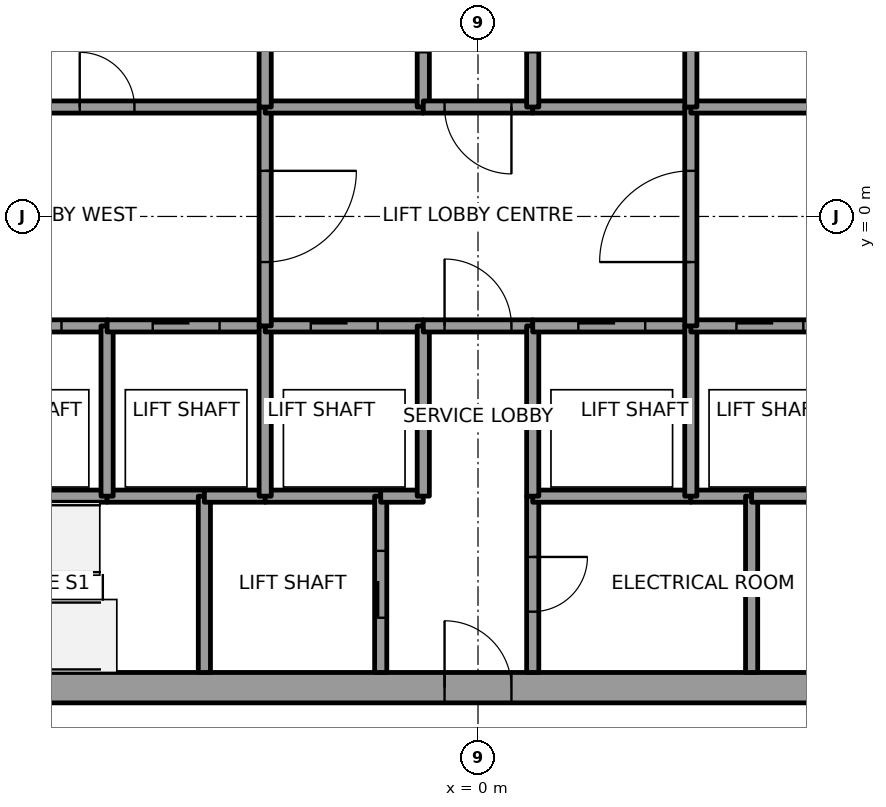
"""IFC4 building model, lengths in metres.
Left out: names, types, materials, properties, quantities, classifications, styles, units other than length and angle.
Written with IfcOpenShell. Run it as: python <this file> out.ifc"""

import sys

from ifc_helpers import new_model, si_unit, direction, frame, frame_2d, origin, place, context, subcontext, project, spatial, rectangle, extrude, element, fill, save


model = new_model("IFC4")
c1 = context("Model", 3, precision=1e-05, world=origin(), true_north=direction((0.0, 1.0)))
c2 = subcontext(c1, "Body", "Model", "MODEL_VIEW")
j1 = project(units=[si_unit("LENGTHUNIT", "METRE"), si_unit("PLANEANGLEUNIT", "RADIAN")], contexts=[c1])
p1 = place(None, origin())
s1 = spatial("IfcSite", under=j1, at=p1, CompositionType="ELEMENT")
p2 = place(p1, origin())
s2 = spatial("IfcBuilding", under=s1, at=p2, CompositionType="ELEMENT")
p3 = place(p2, frame((0.0, 0.0, 231.0)))
s3 = spatial("IfcBuildingStorey", under=s2, at=p3, CompositionType="ELEMENT", Elevation=231.0)
p4 = place(p3, frame((-11.0, -7.75, 0.0), z_axis=(0.0, 0.0, 1.0), x_axis=(1.0, 0.0, 0.0)))
e1 = element("IfcWall", 1, at=p4, inside=s3, PredefinedType="SHEAR", context=c2, shape_type="SweptSolid", body=[
    extrude(rectangle(XDim=22.0, YDim=0.5, at=frame_2d((11.0, 0.0))), origin(), (0.0, 0.0, 1.0), 4.0),
])
p5 = place(p4, frame((10.45, 0.0, 0.0)))
e2 = element("IfcOpeningElement", 2, at=p5, cuts=e1, PredefinedType="OPENING", context=c2, shape_type="SweptSolid", body=[
    extrude(rectangle(XDim=1.1, YDim=2.1, at=frame_2d((0.55, 1.05))), frame((0.0, 0.25, 0.0), z_axis=(0.0, -1.0, 0.0), x_axis=(1.0, 0.0, 0.0)), (0.0, 0.0, 1.0), 0.5),
])
p6 = place(p3, frame((-8.7, -4.6, 0.0), z_axis=(0.0, 0.0, 1.0), x_axis=(1.0, 0.0, 0.0)))
e3 = element("IfcWall", 3, at=p6, inside=s3, PredefinedType="SOLIDWALL", context=c2, shape_type="SweptSolid", body=[
    extrude(rectangle(XDim=2.6, YDim=0.2, at=frame_2d((1.3, 0.0))), origin(), (0.0, 0.0, 1.0), 3.85),
])
p7 = place(p3, frame((-8.7, -1.8, 0.0), z_axis=(0.0, 0.0, 1.0), x_axis=(1.0, 0.0, 0.0)))
e4 = element("IfcWall", 4, at=p7, inside=s3, PredefinedType="SOLIDWALL", context=c2, shape_type="SweptSolid", body=[
    extrude(rectangle(XDim=2.6, YDim=0.2, at=frame_2d((1.3, 0.0))), origin(), (0.0, 0.0, 1.0), 3.85),
])
p8 = place(p7, frame((0.75, 0.0, 0.0)))
e5 = element("IfcOpeningElement", 5, at=p8, cuts=e4, PredefinedType="OPENING", context=c2, shape_type="SweptSolid", body=[
    extrude(rectangle(XDim=1.1, YDim=2.1, at=frame_2d((0.55, 1.05))), frame((0.0, 0.1, 0.0), z_axis=(0.0, -1.0, 0.0), x_axis=(1.0, 0.0, 0.0)), (0.0, 0.0, 1.0), 0.2),
])
p9 = place(p3, frame((-8.7, 1.8, 0.0), z_axis=(0.0, 0.0, 1.0), x_axis=(1.0, 0.0, 0.0)))
e6 = element("IfcWall", 6, at=p9, inside=s3, PredefinedType="SOLIDWALL", context=c2, shape_type="SweptSolid", body=[
    extrude(rectangle(XDim=5.2, YDim=0.2, at=frame_2d((2.6, 0.0))), origin(), (0.0, 0.0, 1.0), 3.85),
])
p10 = place(p9, frame((2.15, 0.0, 0.0)))
e7 = element("IfcOpeningElement", 7, at=p10, cuts=e6, PredefinedType="OPENING", context=c2, shape_type="SweptSolid", body=[
    extrude(rectangle(XDim=0.9, YDim=2.1, at=frame_2d((0.45, 1.05))), frame((0.0, 0.1, 0.0), z_axis=(0.0, -1.0, 0.0), x_axis=(1.0, 0.0, 0.0)), (0.0, 0.0, 1.0), 0.2),
])
p11 = place(p3, frame((-6.1, -4.6, 0.0), z_axis=(0.0, 0.0, 1.0), x_axis=(1.0, 0.0, 0.0)))
e8 = element("IfcWall", 8, at=p11, inside=s3, PredefinedType="SOLIDWALL", context=c2, shape_type="SweptSolid", body=[
    extrude(rectangle(XDim=1.6, YDim=0.2, at=frame_2d((0.8, 0.0))), origin(), (0.0, 0.0, 1.0), 3.85),
])
p12 = place(p3, frame((-6.1, -4.6, 0.0), z_axis=(0.0, 0.0, 1.0), x_axis=(0.0, 1.0, 0.0)))
e9 = element("IfcWall", 9, at=p12, inside=s3, PredefinedType="SOLIDWALL", context=c2, shape_type="SweptSolid", body=[
    extrude(rectangle(XDim=2.8, YDim=0.2, at=frame_2d((1.4, 0.0))), origin(), (0.0, 0.0, 1.0), 3.85),
])
p13 = place(p3, frame((-6.1, -1.8, 0.0), z_axis=(0.0, 0.0, 1.0), x_axis=(1.0, 0.0, 0.0)))
e10 = element("IfcWall", 10, at=p13, inside=s3, PredefinedType="SOLIDWALL", context=c2, shape_type="SweptSolid", body=[
    extrude(rectangle(XDim=2.6, YDim=0.2, at=frame_2d((1.3, 0.0))), origin(), (0.0, 0.0, 1.0), 3.85),
])
p14 = place(p13, frame((0.75, 0.0, 0.0)))
e11 = element("IfcOpeningElement", 11, at=p14, cuts=e10, PredefinedType="OPENING", context=c2, shape_type="SweptSolid", body=[
    extrude(rectangle(XDim=1.1, YDim=2.1, at=frame_2d((0.55, 1.05))), frame((0.0, 0.1, 0.0), z_axis=(0.0, -1.0, 0.0), x_axis=(1.0, 0.0, 0.0)), (0.0, 0.0, 1.0), 0.2),
])
p15 = place(p3, frame((-4.5, -4.6, 0.0), z_axis=(0.0, 0.0, 1.0), x_axis=(0.0, -1.0, 0.0)))
e12 = element("IfcWall", 12, at=p15, inside=s3, PredefinedType="SOLIDWALL", context=c2, shape_type="SweptSolid", body=[
    extrude(rectangle(XDim=2.9, YDim=0.2, at=frame_2d((1.45, 0.0))), origin(), (0.0, 0.0, 1.0), 3.85),
])
p16 = place(p3, frame((-4.5, -4.6, 0.0), z_axis=(0.0, 0.0, 1.0), x_axis=(1.0, 0.0, 0.0)))
e13 = element("IfcWall", 13, at=p16, inside=s3, PredefinedType="SOLIDWALL", context=c2, shape_type="SweptSolid", body=[
    extrude(rectangle(XDim=1.0, YDim=0.2, at=frame_2d((0.5, 0.0))), origin(), (0.0, 0.0, 1.0), 3.85),
])
p17 = place(p3, frame((-3.5, -4.6, 0.0), z_axis=(0.0, 0.0, 1.0), x_axis=(1.0, 0.0, 0.0)))
e14 = element("IfcWall", 14, at=p17, inside=s3, PredefinedType="SOLIDWALL", context=c2, shape_type="SweptSolid", body=[
    extrude(rectangle(XDim=1.9, YDim=0.2, at=frame_2d((0.95, 0.0))), origin(), (0.0, 0.0, 1.0), 3.85),
])
p18 = place(p3, frame((-3.5, -4.6, 0.0), z_axis=(0.0, 0.0, 1.0), x_axis=(0.0, 1.0, 0.0)))
e15 = element("IfcWall", 15, at=p18, inside=s3, PredefinedType="SOLIDWALL", context=c2, shape_type="SweptSolid", body=[
    extrude(rectangle(XDim=2.8, YDim=0.2, at=frame_2d((1.4, 0.0))), origin(), (0.0, 0.0, 1.0), 3.85),
])
p19 = place(p3, frame((-3.5, -1.8, 0.0), z_axis=(0.0, 0.0, 1.0), x_axis=(1.0, 0.0, 0.0)))
e16 = element("IfcWall", 16, at=p19, inside=s3, PredefinedType="SOLIDWALL", context=c2, shape_type="SweptSolid", body=[
    extrude(rectangle(XDim=2.6, YDim=0.2, at=frame_2d((1.3, 0.0))), origin(), (0.0, 0.0, 1.0), 3.85),
])
p20 = place(p19, frame((0.75, 0.0, 0.0)))
e17 = element("IfcOpeningElement", 17, at=p20, cuts=e16, PredefinedType="OPENING", context=c2, shape_type="SweptSolid", body=[
    extrude(rectangle(XDim=1.1, YDim=2.1, at=frame_2d((0.55, 1.05))), frame((0.0, 0.1, 0.0), z_axis=(0.0, -1.0, 0.0), x_axis=(1.0, 0.0, 0.0)), (0.0, 0.0, 1.0), 0.2),
])
p21 = place(p3, frame((-3.5, 1.8, 0.0), z_axis=(0.0, 0.0, 1.0), x_axis=(0.0, -1.0, 0.0)))
e18 = element("IfcWall", 18, at=p21, inside=s3, PredefinedType="SOLIDWALL", context=c2, shape_type="SweptSolid", body=[
    extrude(rectangle(XDim=3.6, YDim=0.2, at=frame_2d((1.8, 0.0))), origin(), (0.0, 0.0, 1.0), 3.85),
])
p22 = place(p21, frame((1.05, 0.0, 0.0)))
e19 = element("IfcOpeningElement", 19, at=p22, cuts=e18, PredefinedType="OPENING", context=c2, shape_type="SweptSolid", body=[
    extrude(rectangle(XDim=1.5, YDim=2.1, at=frame_2d((0.75, 1.05))), frame((0.0, 0.1, 0.0), z_axis=(0.0, -1.0, 0.0), x_axis=(1.0, 0.0, 0.0)), (0.0, 0.0, 1.0), 0.2),
])
p23 = place(p3, frame((-0.9, 1.8, 0.0), z_axis=(0.0, 0.0, 1.0), x_axis=(-1.0, 0.0, 0.0)))
e20 = element("IfcWall", 20, at=p23, inside=s3, PredefinedType="SOLIDWALL", context=c2, shape_type="SweptSolid", body=[
    extrude(rectangle(XDim=2.6, YDim=0.2, at=frame_2d((1.3, 0.0))), origin(), (0.0, 0.0, 1.0), 3.85),
])
p24 = place(p3, frame((-3.5, 1.8, 0.0), z_axis=(0.0, 0.0, 1.0), x_axis=(0.0, 1.0, 0.0)))
e21 = element("IfcWall", 21, at=p24, inside=s3, PredefinedType="SOLIDWALL", context=c2, shape_type="SweptSolid", body=[
    extrude(rectangle(XDim=2.8, YDim=0.2, at=frame_2d((1.4, 0.0))), origin(), (0.0, 0.0, 1.0), 3.85),
])
p25 = place(p3, frame((-0.9, 1.8, 0.0), z_axis=(0.0, 0.0, 1.0), x_axis=(0.0, 1.0, 0.0)))
e22 = element("IfcWall", 22, at=p25, inside=s3, PredefinedType="SOLIDWALL", context=c2, shape_type="SweptSolid", body=[
    extrude(rectangle(XDim=3.0, YDim=0.2, at=frame_2d((1.5, 0.0))), origin(), (0.0, 0.0, 1.0), 3.85),
])
p26 = place(p25, frame((0.9, 0.0, 0.0)))
e23 = element("IfcOpeningElement", 23, at=p26, cuts=e22, PredefinedType="OPENING", context=c2, shape_type="SweptSolid", body=[
    extrude(rectangle(XDim=1.2, YDim=2.1, at=frame_2d((0.6, 1.05))), frame((0.0, 0.1, 0.0), z_axis=(0.0, -1.0, 0.0), x_axis=(1.0, 0.0, 0.0)), (0.0, 0.0, 1.0), 0.2),
])
p27 = place(p3, frame((-1.6, -7.5, 0.0), z_axis=(0.0, 0.0, 1.0), x_axis=(0.0, 1.0, 0.0)))
e24 = element("IfcWall", 24, at=p27, inside=s3, PredefinedType="SOLIDWALL", context=c2, shape_type="SweptSolid", body=[
    extrude(rectangle(XDim=2.9, YDim=0.2, at=frame_2d((1.45, 0.0))), origin(), (0.0, 0.0, 1.0), 3.85),
])
p28 = place(p27, frame((0.9, 0.0, 0.0)))
e25 = element("IfcOpeningElement", 25, at=p28, cuts=e24, PredefinedType="OPENING", context=c2, shape_type="SweptSolid", body=[
    extrude(rectangle(XDim=1.1, YDim=2.1, at=frame_2d((0.55, 1.05))), frame((0.0, 0.1, 0.0), z_axis=(0.0, -1.0, 0.0), x_axis=(1.0, 0.0, 0.0)), (0.0, 0.0, 1.0), 0.2),
])
p29 = place(p3, frame((-1.6, -4.6, 0.0), z_axis=(0.0, 0.0, 1.0), x_axis=(1.0, 0.0, 0.0)))
e26 = element("IfcWall", 26, at=p29, inside=s3, PredefinedType="SOLIDWALL", context=c2, shape_type="SweptSolid", body=[
    extrude(rectangle(XDim=0.7, YDim=0.2, at=frame_2d((0.35, 0.0))), origin(), (0.0, 0.0, 1.0), 3.85),
])
p30 = place(p3, frame((-0.9, -4.6, 0.0), z_axis=(0.0, 0.0, 1.0), x_axis=(0.0, 1.0, 0.0)))
e27 = element("IfcWall", 27, at=p30, inside=s3, PredefinedType="SOLIDWALL", context=c2, shape_type="SweptSolid", body=[
    extrude(rectangle(XDim=2.8, YDim=0.2, at=frame_2d((1.4, 0.0))), origin(), (0.0, 0.0, 1.0), 3.85),
])
p31 = place(p3, frame((-0.9, -1.8, 0.0), z_axis=(0.0, 0.0, 1.0), x_axis=(1.0, 0.0, 0.0)))
e28 = element("IfcWall", 28, at=p31, inside=s3, PredefinedType="SOLIDWALL", context=c2, shape_type="SweptSolid", body=[
    extrude(rectangle(XDim=1.8, YDim=0.2, at=frame_2d((0.9, 0.0))), origin(), (0.0, 0.0, 1.0), 3.85),
])
p32 = place(p31, frame((0.35, 0.0, 0.0)))
e29 = element("IfcOpeningElement", 29, at=p32, cuts=e28, PredefinedType="OPENING", context=c2, shape_type="SweptSolid", body=[
    extrude(rectangle(XDim=1.1, YDim=2.1, at=frame_2d((0.55, 1.05))), frame((0.0, 0.1, 0.0), z_axis=(0.0, -1.0, 0.0), x_axis=(1.0, 0.0, 0.0)), (0.0, 0.0, 1.0), 0.2),
])
p33 = place(p3, frame((0.9, 1.8, 0.0), z_axis=(0.0, 0.0, 1.0), x_axis=(-1.0, 0.0, 0.0)))
e30 = element("IfcWall", 30, at=p33, inside=s3, PredefinedType="SOLIDWALL", context=c2, shape_type="SweptSolid", body=[
    extrude(rectangle(XDim=1.8, YDim=0.2, at=frame_2d((0.9, 0.0))), origin(), (0.0, 0.0, 1.0), 3.85),
])
p34 = place(p33, frame((0.35, 0.0, 0.0)))
e31 = element("IfcOpeningElement", 31, at=p34, cuts=e30, PredefinedType="OPENING", context=c2, shape_type="SweptSolid", body=[
    extrude(rectangle(XDim=1.1, YDim=2.1, at=frame_2d((0.55, 1.05))), frame((0.0, 0.1, 0.0), z_axis=(0.0, -1.0, 0.0), x_axis=(1.0, 0.0, 0.0)), (0.0, 0.0, 1.0), 0.2),
])
p35 = place(p3, frame((0.9, -4.6, 0.0), z_axis=(0.0, 0.0, 1.0), x_axis=(0.0, -1.0, 0.0)))
e32 = element("IfcWall", 32, at=p35, inside=s3, PredefinedType="SOLIDWALL", context=c2, shape_type="SweptSolid", body=[
    extrude(rectangle(XDim=2.9, YDim=0.2, at=frame_2d((1.45, 0.0))), origin(), (0.0, 0.0, 1.0), 3.85),
])
p36 = place(p35, frame((1.0, 0.0, 0.0)))
e33 = element("IfcOpeningElement", 33, at=p36, cuts=e32, PredefinedType="OPENING", context=c2, shape_type="SweptSolid", body=[
    extrude(rectangle(XDim=0.9, YDim=2.1, at=frame_2d((0.45, 1.05))), frame((0.0, 0.1, 0.0), z_axis=(0.0, -1.0, 0.0), x_axis=(1.0, 0.0, 0.0)), (0.0, 0.0, 1.0), 0.2),
])
p37 = place(p3, frame((3.5, -4.6, 0.0), z_axis=(0.0, 0.0, 1.0), x_axis=(-1.0, 0.0, 0.0)))
e34 = element("IfcWall", 34, at=p37, inside=s3, PredefinedType="SOLIDWALL", context=c2, shape_type="SweptSolid", body=[
    extrude(rectangle(XDim=2.6, YDim=0.2, at=frame_2d((1.3, 0.0))), origin(), (0.0, 0.0, 1.0), 3.85),
])
p38 = place(p3, frame((0.9, -1.8, 0.0), z_axis=(0.0, 0.0, 1.0), x_axis=(0.0, -1.0, 0.0)))
e35 = element("IfcWall", 35, at=p38, inside=s3, PredefinedType="SOLIDWALL", context=c2, shape_type="SweptSolid", body=[
    extrude(rectangle(XDim=2.8, YDim=0.2, at=frame_2d((1.4, 0.0))), origin(), (0.0, 0.0, 1.0), 3.85),
])
p39 = place(p3, frame((0.9, -1.8, 0.0), z_axis=(0.0, 0.0, 1.0), x_axis=(1.0, 0.0, 0.0)))
e36 = element("IfcWall", 36, at=p39, inside=s3, PredefinedType="SOLIDWALL", context=c2, shape_type="SweptSolid", body=[
    extrude(rectangle(XDim=2.6, YDim=0.2, at=frame_2d((1.3, 0.0))), origin(), (0.0, 0.0, 1.0), 3.85),
])
p40 = place(p39, frame((0.75, 0.0, 0.0)))
e37 = element("IfcOpeningElement", 37, at=p40, cuts=e36, PredefinedType="OPENING", context=c2, shape_type="SweptSolid", body=[
    extrude(rectangle(XDim=1.1, YDim=2.1, at=frame_2d((0.55, 1.05))), frame((0.0, 0.1, 0.0), z_axis=(0.0, -1.0, 0.0), x_axis=(1.0, 0.0, 0.0)), (0.0, 0.0, 1.0), 0.2),
])
p41 = place(p3, frame((3.5, 1.8, 0.0), z_axis=(0.0, 0.0, 1.0), x_axis=(-1.0, 0.0, 0.0)))
e38 = element("IfcWall", 38, at=p41, inside=s3, PredefinedType="SOLIDWALL", context=c2, shape_type="SweptSolid", body=[
    extrude(rectangle(XDim=2.6, YDim=0.2, at=frame_2d((1.3, 0.0))), origin(), (0.0, 0.0, 1.0), 3.85),
])
p42 = place(p3, frame((0.9, 4.8, 0.0), z_axis=(0.0, 0.0, 1.0), x_axis=(0.0, -1.0, 0.0)))
e39 = element("IfcWall", 39, at=p42, inside=s3, PredefinedType="SOLIDWALL", context=c2, shape_type="SweptSolid", body=[
    extrude(rectangle(XDim=3.0, YDim=0.2, at=frame_2d((1.5, 0.0))), origin(), (0.0, 0.0, 1.0), 3.85),
])
p43 = place(p42, frame((0.9, 0.0, 0.0)))
e40 = element("IfcOpeningElement", 40, at=p43, cuts=e39, PredefinedType="OPENING", context=c2, shape_type="SweptSolid", body=[
    extrude(rectangle(XDim=1.2, YDim=2.1, at=frame_2d((0.6, 1.05))), frame((0.0, 0.1, 0.0), z_axis=(0.0, -1.0, 0.0), x_axis=(1.0, 0.0, 0.0)), (0.0, 0.0, 1.0), 0.2),
])
p44 = place(p3, frame((4.5, -4.6, 0.0), z_axis=(0.0, 0.0, 1.0), x_axis=(-1.0, 0.0, 0.0)))
e41 = element("IfcWall", 41, at=p44, inside=s3, PredefinedType="SOLIDWALL", context=c2, shape_type="SweptSolid", body=[
    extrude(rectangle(XDim=1.0, YDim=0.2, at=frame_2d((0.5, 0.0))), origin(), (0.0, 0.0, 1.0), 3.85),
])
p45 = place(p3, frame((3.5, -4.6, 0.0), z_axis=(0.0, 0.0, 1.0), x_axis=(0.0, 1.0, 0.0)))
e42 = element("IfcWall", 42, at=p45, inside=s3, PredefinedType="SOLIDWALL", context=c2, shape_type="SweptSolid", body=[
    extrude(rectangle(XDim=2.8, YDim=0.2, at=frame_2d((1.4, 0.0))), origin(), (0.0, 0.0, 1.0), 3.85),
])
p46 = place(p3, frame((3.5, -1.8, 0.0), z_axis=(0.0, 0.0, 1.0), x_axis=(1.0, 0.0, 0.0)))
e43 = element("IfcWall", 43, at=p46, inside=s3, PredefinedType="SOLIDWALL", context=c2, shape_type="SweptSolid", body=[
    extrude(rectangle(XDim=2.6, YDim=0.2, at=frame_2d((1.3, 0.0))), origin(), (0.0, 0.0, 1.0), 3.85),
])
p47 = place(p46, frame((0.75, 0.0, 0.0)))
e44 = element("IfcOpeningElement", 44, at=p47, cuts=e43, PredefinedType="OPENING", context=c2, shape_type="SweptSolid", body=[
    extrude(rectangle(XDim=1.1, YDim=2.1, at=frame_2d((0.55, 1.05))), frame((0.0, 0.1, 0.0), z_axis=(0.0, -1.0, 0.0), x_axis=(1.0, 0.0, 0.0)), (0.0, 0.0, 1.0), 0.2),
])
p48 = place(p3, frame((3.5, -1.8, 0.0), z_axis=(0.0, 0.0, 1.0), x_axis=(0.0, 1.0, 0.0)))
e45 = element("IfcWall", 45, at=p48, inside=s3, PredefinedType="SOLIDWALL", context=c2, shape_type="SweptSolid", body=[
    extrude(rectangle(XDim=3.6, YDim=0.2, at=frame_2d((1.8, 0.0))), origin(), (0.0, 0.0, 1.0), 3.85),
])
p49 = place(p48, frame((1.05, 0.0, 0.0)))
e46 = element("IfcOpeningElement", 46, at=p49, cuts=e45, PredefinedType="OPENING", context=c2, shape_type="SweptSolid", body=[
    extrude(rectangle(XDim=1.5, YDim=2.1, at=frame_2d((0.75, 1.05))), frame((0.0, 0.1, 0.0), z_axis=(0.0, -1.0, 0.0), x_axis=(1.0, 0.0, 0.0)), (0.0, 0.0, 1.0), 0.2),
])
p50 = place(p3, frame((3.5, 1.8, 0.0), z_axis=(0.0, 0.0, 1.0), x_axis=(1.0, 0.0, 0.0)))
e47 = element("IfcWall", 47, at=p50, inside=s3, PredefinedType="SOLIDWALL", context=c2, shape_type="SweptSolid", body=[
    extrude(rectangle(XDim=5.2, YDim=0.2, at=frame_2d((2.6, 0.0))), origin(), (0.0, 0.0, 1.0), 3.85),
])
p51 = place(p50, frame((2.15, 0.0, 0.0)))
e48 = element("IfcOpeningElement", 48, at=p51, cuts=e47, PredefinedType="OPENING", context=c2, shape_type="SweptSolid", body=[
    extrude(rectangle(XDim=0.9, YDim=2.1, at=frame_2d((0.45, 1.05))), frame((0.0, 0.1, 0.0), z_axis=(0.0, -1.0, 0.0), x_axis=(1.0, 0.0, 0.0)), (0.0, 0.0, 1.0), 0.2),
])
p52 = place(p3, frame((3.5, 4.6, 0.0), z_axis=(0.0, 0.0, 1.0), x_axis=(0.0, -1.0, 0.0)))
e49 = element("IfcWall", 49, at=p52, inside=s3, PredefinedType="SOLIDWALL", context=c2, shape_type="SweptSolid", body=[
    extrude(rectangle(XDim=2.8, YDim=0.2, at=frame_2d((1.4, 0.0))), origin(), (0.0, 0.0, 1.0), 3.85),
])
p53 = place(p3, frame((4.5, -4.6, 0.0), z_axis=(0.0, 0.0, 1.0), x_axis=(0.0, -1.0, 0.0)))
e50 = element("IfcWall", 50, at=p53, inside=s3, PredefinedType="SOLIDWALL", context=c2, shape_type="SweptSolid", body=[
    extrude(rectangle(XDim=2.9, YDim=0.2, at=frame_2d((1.45, 0.0))), origin(), (0.0, 0.0, 1.0), 3.85),
])
p54 = place(p3, frame((6.1, -4.6, 0.0), z_axis=(0.0, 0.0, 1.0), x_axis=(-1.0, 0.0, 0.0)))
e51 = element("IfcWall", 51, at=p54, inside=s3, PredefinedType="SOLIDWALL", context=c2, shape_type="SweptSolid", body=[
    extrude(rectangle(XDim=1.6, YDim=0.2, at=frame_2d((0.8, 0.0))), origin(), (0.0, 0.0, 1.0), 3.85),
])
p55 = place(p8, origin())
e52 = element("IfcDoor", 52, at=p55, inside=s3, OperationType="SLIDING_TO_LEFT", PredefinedType="DOOR", context=c2, shape_type="SweptSolid", body=[
    extrude(rectangle(XDim=1.1, YDim=2.1, at=frame_2d((0.55, 1.05))), frame((0.0, 0.025, 0.0), z_axis=(0.0, -1.0, 0.0), x_axis=(1.0, 0.0, 0.0)), (0.0, 0.0, 1.0), 0.05),
])
fill(e5, e52)
p56 = place(p14, origin())
e53 = element("IfcDoor", 53, at=p56, inside=s3, OperationType="SLIDING_TO_RIGHT", PredefinedType="DOOR", context=c2, shape_type="SweptSolid", body=[
    extrude(rectangle(XDim=1.1, YDim=2.1, at=frame_2d((0.55, 1.05))), frame((0.0, 0.025, 0.0), z_axis=(0.0, -1.0, 0.0), x_axis=(1.0, 0.0, 0.0)), (0.0, 0.0, 1.0), 0.05),
])
fill(e11, e53)
p57 = place(p20, origin())
e54 = element("IfcDoor", 54, at=p57, inside=s3, OperationType="SLIDING_TO_LEFT", PredefinedType="DOOR", context=c2, shape_type="SweptSolid", body=[
    extrude(rectangle(XDim=1.1, YDim=2.1, at=frame_2d((0.55, 1.05))), frame((0.0, 0.025, 0.0), z_axis=(0.0, -1.0, 0.0), x_axis=(1.0, 0.0, 0.0)), (0.0, 0.0, 1.0), 0.05),
])
fill(e17, e54)
p58 = place(p40, origin())
e55 = element("IfcDoor", 55, at=p58, inside=s3, OperationType="SLIDING_TO_LEFT", PredefinedType="DOOR", context=c2, shape_type="SweptSolid", body=[
    extrude(rectangle(XDim=1.1, YDim=2.1, at=frame_2d((0.55, 1.05))), frame((0.0, 0.025, 0.0), z_axis=(0.0, -1.0, 0.0), x_axis=(1.0, 0.0, 0.0)), (0.0, 0.0, 1.0), 0.05),
])
fill(e37, e55)
p59 = place(p47, origin())
e56 = element("IfcDoor", 56, at=p59, inside=s3, OperationType="SLIDING_TO_RIGHT", PredefinedType="DOOR", context=c2, shape_type="SweptSolid", body=[
    extrude(rectangle(XDim=1.1, YDim=2.1, at=frame_2d((0.55, 1.05))), frame((0.0, 0.025, 0.0), z_axis=(0.0, -1.0, 0.0), x_axis=(1.0, 0.0, 0.0)), (0.0, 0.0, 1.0), 0.05),
])
fill(e44, e56)
p60 = place(p28, origin())
e57 = element("IfcDoor", 57, at=p60, inside=s3, OperationType="SLIDING_TO_LEFT", PredefinedType="DOOR", context=c2, shape_type="SweptSolid", body=[
    extrude(rectangle(XDim=1.1, YDim=2.1, at=frame_2d((0.55, 1.05))), frame((0.0, 0.025, 0.0), z_axis=(0.0, -1.0, 0.0), x_axis=(1.0, 0.0, 0.0)), (0.0, 0.0, 1.0), 0.05),
])
fill(e25, e57)
p61 = place(p22, origin())
e58 = element("IfcDoor", 58, at=p61, inside=s3, OperationType="DOUBLE_DOOR_SINGLE_SWING", PredefinedType="DOOR", context=c2, shape_type="SweptSolid", body=[
    extrude(rectangle(XDim=1.5, YDim=2.1, at=frame_2d((0.75, 1.05))), frame((0.0, 0.025, 0.0), z_axis=(0.0, -1.0, 0.0), x_axis=(1.0, 0.0, 0.0)), (0.0, 0.0, 1.0), 0.05),
])
fill(e19, e58)
p62 = place(p49, origin())
e59 = element("IfcDoor", 59, at=p62, inside=s3, OperationType="DOUBLE_DOOR_SINGLE_SWING", PredefinedType="DOOR", context=c2, shape_type="SweptSolid", body=[
    extrude(rectangle(XDim=1.5, YDim=2.1, at=frame_2d((0.75, 1.05))), frame((0.0, 0.025, 0.0), z_axis=(0.0, -1.0, 0.0), x_axis=(1.0, 0.0, 0.0)), (0.0, 0.0, 1.0), 0.05),
])
fill(e46, e59)
p63 = place(p34, origin())
e60 = element("IfcDoor", 60, at=p63, inside=s3, OperationType="SINGLE_SWING_RIGHT", PredefinedType="DOOR", context=c2, shape_type="SweptSolid", body=[
    extrude(rectangle(XDim=1.1, YDim=2.1, at=frame_2d((0.55, 1.05))), frame((0.0, 0.025, 0.0), z_axis=(0.0, -1.0, 0.0), x_axis=(1.0, 0.0, 0.0)), (0.0, 0.0, 1.0), 0.05),
])
fill(e31, e60)
p64 = place(p32, origin())
e61 = element("IfcDoor", 61, at=p64, inside=s3, OperationType="SINGLE_SWING_RIGHT", PredefinedType="DOOR", context=c2, shape_type="SweptSolid", body=[
    extrude(rectangle(XDim=1.1, YDim=2.1, at=frame_2d((0.55, 1.05))), frame((0.0, 0.025, 0.0), z_axis=(0.0, -1.0, 0.0), x_axis=(1.0, 0.0, 0.0)), (0.0, 0.0, 1.0), 0.05),
])
fill(e29, e61)
p65 = place(p10, origin())
e62 = element("IfcDoor", 62, at=p65, inside=s3, OperationType="SINGLE_SWING_LEFT", PredefinedType="DOOR", context=c2, shape_type="SweptSolid", body=[
    extrude(rectangle(XDim=0.9, YDim=2.1, at=frame_2d((0.45, 1.05))), frame((0.0, 0.025, 0.0), z_axis=(0.0, -1.0, 0.0), x_axis=(1.0, 0.0, 0.0)), (0.0, 0.0, 1.0), 0.05),
])
fill(e7, e62)
p66 = place(p36, origin())
e63 = element("IfcDoor", 63, at=p66, inside=s3, OperationType="SINGLE_SWING_RIGHT", PredefinedType="DOOR", context=c2, shape_type="SweptSolid", body=[
    extrude(rectangle(XDim=0.9, YDim=2.1, at=frame_2d((0.45, 1.05))), frame((0.0, 0.025, 0.0), z_axis=(0.0, -1.0, 0.0), x_axis=(1.0, 0.0, 0.0)), (0.0, 0.0, 1.0), 0.05),
])
fill(e33, e63)
p67 = place(p5, origin())
e64 = element("IfcDoor", 64, at=p67, inside=s3, OperationType="SINGLE_SWING_RIGHT", PredefinedType="DOOR", context=c2, shape_type="SweptSolid", body=[
    extrude(rectangle(XDim=1.1, YDim=2.1, at=frame_2d((0.55, 1.05))), frame((0.0, 0.025, 0.0), z_axis=(0.0, -1.0, 0.0), x_axis=(1.0, 0.0, 0.0)), (0.0, 0.0, 1.0), 0.05),
])
fill(e2, e64)
save(model, sys.argv[1])
